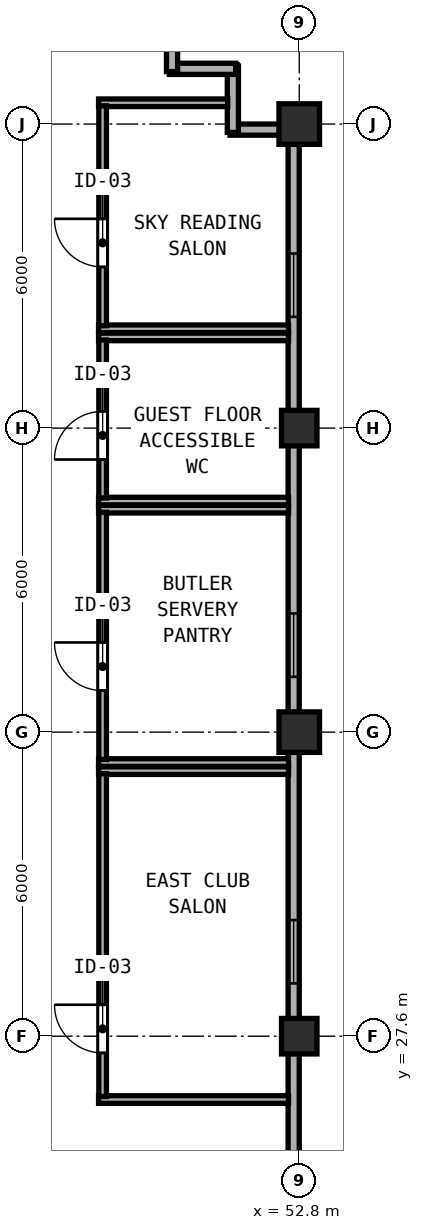
"""IFC4 building model, lengths in metres.
Left out: names, types, materials, properties, quantities, classifications, styles, units other than length and angle.
Written with IfcOpenShell. Run it as: python <this file> out.ifc"""

import sys

from ifc_helpers import new_model, si_unit, direction, frame, frame_2d, origin, origin_2d, place, context, subcontext, project, spatial, rectangle, hollow_rectangle, extrude, element, fill, save


model = new_model("IFC4")
c1 = context("Model", 3, precision=1e-05, world=origin(), true_north=direction((0.0, 1.0)))
c2 = subcontext(c1, "Body", "Model", "MODEL_VIEW")
j1 = project(units=[si_unit("LENGTHUNIT", "METRE"), si_unit("PLANEANGLEUNIT", "RADIAN")], contexts=[c1])
p1 = place(None, origin())
s1 = spatial("IfcSite", under=j1, at=p1, CompositionType="ELEMENT")
p2 = place(p1, origin())
s2 = spatial("IfcBuilding", under=s1, at=p2, CompositionType="ELEMENT")
p3 = place(p2, frame((0.0, 0.0, 254.45)))
s3 = spatial("IfcBuildingStorey", under=s2, at=p3, CompositionType="ELEMENT", Elevation=254.45)
for number, where, z_axis, x_axis in (
    (1, (52.8, 33.6, 0.0), (0.0, 0.0, 1.0), (1.0, 0.0, 0.0)),
    (2, (52.8, 45.6, 0.0), (0.0, 0.0, 1.0), (1.0, 0.0, 0.0)),
):
    element("IfcColumn", number, at=place(p3, frame(where, z_axis=z_axis, x_axis=x_axis)), inside=s3, PredefinedType="COLUMN", context=c2, shape_type="SweptSolid", body=[
        extrude(hollow_rectangle(XDim=0.8, YDim=0.8, WallThickness=0.03, at=origin_2d()), origin(), (0.0, 0.0, 1.0), 3.85),
    ])
for number, where, z_axis, x_axis in (
    (3, (52.8, 27.6, 0.0), (0.0, 0.0, 1.0), (1.0, 0.0, 0.0)),
    (4, (52.8, 39.6, 0.0), (0.0, 0.0, 1.0), (1.0, 0.0, 0.0)),
):
    element("IfcColumn", number, at=place(p3, frame(where, z_axis=z_axis, x_axis=x_axis)), inside=s3, PredefinedType="COLUMN", context=c2, shape_type="SweptSolid", body=[
        extrude(hollow_rectangle(XDim=0.7, YDim=0.7, WallThickness=0.026, at=origin_2d()), origin(), (0.0, 0.0, 1.0), 3.85),
    ])
p4 = place(p3, frame((52.69, 21.992, 0.0), z_axis=(0.0, 0.0, 1.0), x_axis=(0.0, 1.0, 0.0)))
e5 = element("IfcWall", 5, at=p4, inside=s3, PredefinedType="SOLIDWALL", context=c2, shape_type="SweptSolid", body=[
    extrude(rectangle(XDim=5.266, YDim=0.22, at=frame_2d((2.633, 0.0))), origin(), (0.0, 0.0, 1.0), 3.315),
])
p5 = place(p4, frame((0.7, 0.0, 0.85)))
e6 = element("IfcOpeningElement", 6, at=p5, cuts=e5, PredefinedType="OPENING", context=c2, shape_type="SweptSolid", body=[
    extrude(rectangle(XDim=1.25, YDim=1.95, at=frame_2d((0.625, 0.975))), frame((0.0, 0.12, 0.0), z_axis=(0.0, -1.0, 0.0), x_axis=(1.0, 0.0, 0.0)), (0.0, 0.0, 1.0), 0.24),
])
p6 = place(p3, frame((52.69, 27.942, 0.0), z_axis=(0.0, 0.0, 1.0), x_axis=(0.0, 1.0, 0.0)))
e7 = element("IfcWall", 7, at=p6, inside=s3, PredefinedType="SOLIDWALL", context=c2, shape_type="SweptSolid", body=[
    extrude(rectangle(XDim=5.266, YDim=0.22, at=frame_2d((2.633, 0.0))), origin(), (0.0, 0.0, 1.0), 3.315),
])
p7 = place(p6, frame((0.7, 0.0, 0.85)))
e8 = element("IfcOpeningElement", 8, at=p7, cuts=e7, PredefinedType="OPENING", context=c2, shape_type="SweptSolid", body=[
    extrude(rectangle(XDim=1.25, YDim=1.95, at=frame_2d((0.625, 0.975))), frame((0.0, 0.12, 0.0), z_axis=(0.0, -1.0, 0.0), x_axis=(1.0, 0.0, 0.0)), (0.0, 0.0, 1.0), 0.24),
])
p8 = place(p3, frame((52.69, 33.992, 0.0), z_axis=(0.0, 0.0, 1.0), x_axis=(0.0, 1.0, 0.0)))
e9 = element("IfcWall", 9, at=p8, inside=s3, PredefinedType="SOLIDWALL", context=c2, shape_type="SweptSolid", body=[
    extrude(rectangle(XDim=5.266, YDim=0.22, at=frame_2d((2.633, 0.0))), origin(), (0.0, 0.0, 1.0), 3.315),
])
p9 = place(p8, frame((0.7, 0.0, 0.85)))
e10 = element("IfcOpeningElement", 10, at=p9, cuts=e9, PredefinedType="OPENING", context=c2, shape_type="SweptSolid", body=[
    extrude(rectangle(XDim=1.25, YDim=1.95, at=frame_2d((0.625, 0.975))), frame((0.0, 0.12, 0.0), z_axis=(0.0, -1.0, 0.0), x_axis=(1.0, 0.0, 0.0)), (0.0, 0.0, 1.0), 0.24),
])
p10 = place(p3, frame((52.69, 39.942, 0.0), z_axis=(0.0, 0.0, 1.0), x_axis=(0.0, 1.0, 0.0)))
e11 = element("IfcWall", 11, at=p10, inside=s3, PredefinedType="SOLIDWALL", context=c2, shape_type="SweptSolid", body=[
    extrude(rectangle(XDim=5.266, YDim=0.22, at=frame_2d((2.633, 0.0))), origin(), (0.0, 0.0, 1.0), 3.315),
])
p11 = place(p10, frame((1.853, 0.0, 0.85)))
e12 = element("IfcOpeningElement", 12, at=p11, cuts=e11, PredefinedType="OPENING", context=c2, shape_type="SweptSolid", body=[
    extrude(rectangle(XDim=1.25, YDim=1.95, at=frame_2d((0.625, 0.975))), frame((0.0, 0.12, 0.0), z_axis=(0.0, -1.0, 0.0), x_axis=(1.0, 0.0, 0.0)), (0.0, 0.0, 1.0), 0.24),
])
p12 = place(p3, frame((52.408, 45.49, 0.0), z_axis=(0.0, 0.0, 1.0), x_axis=(-1.0, 0.0, 0.0)))
e13 = element("IfcWall", 13, at=p12, inside=s3, PredefinedType="SOLIDWALL", context=c2, shape_type="SweptSolid", body=[
    extrude(rectangle(XDim=0.973, YDim=0.22, at=frame_2d((0.486, 0.0))), origin(), (0.0, 0.0, 1.0), 3.67),
])
p13 = place(p3, frame((51.49, 45.435, 0.0), z_axis=(0.0, 0.0, 1.0), x_axis=(0.0, 1.0, 0.0)))
e14 = element("IfcWall", 14, at=p13, inside=s3, PredefinedType="SOLIDWALL", context=c2, shape_type="SweptSolid", body=[
    extrude(rectangle(XDim=1.31, YDim=0.22, at=frame_2d((0.655, 0.0))), origin(), (0.0, 0.0, 1.0), 3.67),
])
p14 = place(p3, frame((51.545, 46.69, 0.0), z_axis=(0.0, 0.0, 1.0), x_axis=(-1.0, 0.0, 0.0)))
e15 = element("IfcWall", 15, at=p14, inside=s3, PredefinedType="SOLIDWALL", context=c2, shape_type="SweptSolid", body=[
    extrude(rectangle(XDim=1.31, YDim=0.22, at=frame_2d((0.655, 0.0))), origin(), (0.0, 0.0, 1.0), 3.67),
])
p15 = place(p3, frame((50.29, 46.635, 0.0), z_axis=(0.0, 0.0, 1.0), x_axis=(0.0, 1.0, 0.0)))
e16 = element("IfcWall", 16, at=p15, inside=s3, PredefinedType="SOLIDWALL", context=c2, shape_type="SweptSolid", body=[
    extrude(rectangle(XDim=1.535, YDim=0.22, at=frame_2d((0.768, 0.0))), origin(), (0.0, 0.0, 1.0), 3.67),
])
for number, where, z_axis, x_axis in (
    (17, (48.84, 38.0, 0.0), (0.0, 0.0, 1.0), (1.0, 0.0, 0.0)),
    (18, (48.84, 33.0, 0.0), (0.0, 0.0, 1.0), (1.0, 0.0, 0.0)),
):
    element("IfcWall", number, at=place(p3, frame(where, z_axis=z_axis, x_axis=x_axis)), inside=s3, PredefinedType="PARTITIONING", context=c2, shape_type="SweptSolid", body=[
        extrude(rectangle(XDim=3.748, YDim=0.15, at=frame_2d((1.874, 0.0))), origin(), (0.0, 0.0, 1.0), 3.67),
    ])
p16 = place(p3, frame((48.92, 33.06, 0.0), z_axis=(0.0, 0.0, 1.0), x_axis=(0.0, 1.0, 0.0)))
e19 = element("IfcWall", 19, at=p16, inside=s3, PredefinedType="PARTITIONING", context=c2, shape_type="SweptSolid", body=[
    extrude(rectangle(XDim=4.88, YDim=0.15, at=frame_2d((2.44, 0.0))), origin(), (0.0, 0.0, 1.0), 3.67),
])
p17 = place(p16, frame((1.36, 0.0, 0.0)))
e20 = element("IfcOpeningElement", 20, at=p17, cuts=e19, PredefinedType="OPENING", context=c2, shape_type="SweptSolid", body=[
    extrude(rectangle(XDim=0.95, YDim=2.12, at=frame_2d((0.475, 1.06))), frame((0.0, 0.085, 0.0), z_axis=(0.0, -1.0, 0.0), x_axis=(1.0, 0.0, 0.0)), (0.0, 0.0, 1.0), 0.17),
])
for number, where, z_axis, x_axis in (
    (21, (48.84, 41.4, 0.0), (0.0, 0.0, 1.0), (1.0, 0.0, 0.0)),
    (22, (48.84, 38.16, 0.0), (0.0, 0.0, 1.0), (1.0, 0.0, 0.0)),
):
    element("IfcWall", number, at=place(p3, frame(where, z_axis=z_axis, x_axis=x_axis)), inside=s3, PredefinedType="PARTITIONING", context=c2, shape_type="SweptSolid", body=[
        extrude(rectangle(XDim=3.748, YDim=0.15, at=frame_2d((1.874, 0.0))), origin(), (0.0, 0.0, 1.0), 3.67),
    ])
p18 = place(p3, frame((48.92, 38.22, 0.0), z_axis=(0.0, 0.0, 1.0), x_axis=(0.0, 1.0, 0.0)))
e23 = element("IfcWall", 23, at=p18, inside=s3, PredefinedType="PARTITIONING", context=c2, shape_type="SweptSolid", body=[
    extrude(rectangle(XDim=3.12, YDim=0.15, at=frame_2d((1.56, 0.0))), origin(), (0.0, 0.0, 1.0), 3.67),
])
p19 = place(p18, frame((0.76, 0.0, 0.0)))
e24 = element("IfcOpeningElement", 24, at=p19, cuts=e23, PredefinedType="OPENING", context=c2, shape_type="SweptSolid", body=[
    extrude(rectangle(XDim=0.95, YDim=2.12, at=frame_2d((0.475, 1.06))), frame((0.0, 0.085, 0.0), z_axis=(0.0, -1.0, 0.0), x_axis=(1.0, 0.0, 0.0)), (0.0, 0.0, 1.0), 0.17),
])
p20 = place(p3, frame((48.84, 46.02, 0.0), z_axis=(0.0, 0.0, 1.0), x_axis=(1.0, 0.0, 0.0)))
e25 = element("IfcWall", 25, at=p20, inside=s3, PredefinedType="PARTITIONING", context=c2, shape_type="SweptSolid", body=[
    extrude(rectangle(XDim=2.548, YDim=0.15, at=frame_2d((1.274, 0.0))), origin(), (0.0, 0.0, 1.0), 3.67),
])
p21 = place(p3, frame((48.84, 41.56, 0.0), z_axis=(0.0, 0.0, 1.0), x_axis=(1.0, 0.0, 0.0)))
e26 = element("IfcWall", 26, at=p21, inside=s3, PredefinedType="PARTITIONING", context=c2, shape_type="SweptSolid", body=[
    extrude(rectangle(XDim=3.748, YDim=0.15, at=frame_2d((1.874, 0.0))), origin(), (0.0, 0.0, 1.0), 3.67),
])
p22 = place(p3, frame((48.92, 41.62, 0.0), z_axis=(0.0, 0.0, 1.0), x_axis=(0.0, 1.0, 0.0)))
e27 = element("IfcWall", 27, at=p22, inside=s3, PredefinedType="PARTITIONING", context=c2, shape_type="SweptSolid", body=[
    extrude(rectangle(XDim=4.34, YDim=0.15, at=frame_2d((2.17, 0.0))), origin(), (0.0, 0.0, 1.0), 3.67),
])
p23 = place(p22, frame((1.16, 0.0, 0.0)))
e28 = element("IfcOpeningElement", 28, at=p23, cuts=e27, PredefinedType="OPENING", context=c2, shape_type="SweptSolid", body=[
    extrude(rectangle(XDim=0.95, YDim=2.12, at=frame_2d((0.475, 1.06))), frame((0.0, 0.085, 0.0), z_axis=(0.0, -1.0, 0.0), x_axis=(1.0, 0.0, 0.0)), (0.0, 0.0, 1.0), 0.17),
])
for number, where, z_axis, x_axis in (
    (29, (48.84, 32.84, 0.0), (0.0, 0.0, 1.0), (1.0, 0.0, 0.0)),
    (30, (48.84, 26.35, 0.0), (0.0, 0.0, 1.0), (1.0, 0.0, 0.0)),
):
    element("IfcWall", number, at=place(p3, frame(where, z_axis=z_axis, x_axis=x_axis)), inside=s3, PredefinedType="PARTITIONING", context=c2, shape_type="SweptSolid", body=[
        extrude(rectangle(XDim=3.748, YDim=0.15, at=frame_2d((1.874, 0.0))), origin(), (0.0, 0.0, 1.0), 3.67),
    ])
p24 = place(p3, frame((48.92, 26.41, 0.0), z_axis=(0.0, 0.0, 1.0), x_axis=(0.0, 1.0, 0.0)))
e31 = element("IfcWall", 31, at=p24, inside=s3, PredefinedType="PARTITIONING", context=c2, shape_type="SweptSolid", body=[
    extrude(rectangle(XDim=6.37, YDim=0.15, at=frame_2d((3.185, 0.0))), origin(), (0.0, 0.0, 1.0), 3.67),
])
p25 = place(p24, frame((0.86, 0.0, 0.0)))
e32 = element("IfcOpeningElement", 32, at=p25, cuts=e31, PredefinedType="OPENING", context=c2, shape_type="SweptSolid", body=[
    extrude(rectangle(XDim=0.95, YDim=2.12, at=frame_2d((0.475, 1.06))), frame((0.0, 0.085, 0.0), z_axis=(0.0, -1.0, 0.0), x_axis=(1.0, 0.0, 0.0)), (0.0, 0.0, 1.0), 0.17),
])
p26 = place(p7, origin())
e33 = element("IfcWindow", 33, at=p26, inside=s3, PartitioningType="SINGLE_PANEL", PredefinedType="WINDOW", context=c2, shape_type="SweptSolid", body=[
    extrude(rectangle(XDim=1.25, YDim=1.95, at=frame_2d((0.625, 0.975))), frame((0.0, 0.03, 0.0), z_axis=(0.0, -1.0, 0.0), x_axis=(1.0, 0.0, 0.0)), (0.0, 0.0, 1.0), 0.06),
])
fill(e8, e33)
p27 = place(p9, origin())
e34 = element("IfcWindow", 34, at=p27, inside=s3, PartitioningType="SINGLE_PANEL", PredefinedType="WINDOW", context=c2, shape_type="SweptSolid", body=[
    extrude(rectangle(XDim=1.25, YDim=1.95, at=frame_2d((0.625, 0.975))), frame((0.0, 0.03, 0.0), z_axis=(0.0, -1.0, 0.0), x_axis=(1.0, 0.0, 0.0)), (0.0, 0.0, 1.0), 0.06),
])
fill(e10, e34)
p28 = place(p11, origin())
e35 = element("IfcWindow", 35, at=p28, inside=s3, PartitioningType="SINGLE_PANEL", PredefinedType="WINDOW", context=c2, shape_type="SweptSolid", body=[
    extrude(rectangle(XDim=1.25, YDim=1.95, at=frame_2d((0.625, 0.975))), frame((0.0, 0.03, 0.0), z_axis=(0.0, -1.0, 0.0), x_axis=(1.0, 0.0, 0.0)), (0.0, 0.0, 1.0), 0.06),
])
fill(e12, e35)
p29 = place(p17, origin())
e36 = element("IfcDoor", 36, at=p29, inside=s3, OperationType="SINGLE_SWING_RIGHT", PredefinedType="DOOR", context=c2, shape_type="SweptSolid", body=[
    extrude(rectangle(XDim=0.95, YDim=2.12, at=frame_2d((0.475, 1.06))), frame((0.0, 0.025, 0.0), z_axis=(0.0, -1.0, 0.0), x_axis=(1.0, 0.0, 0.0)), (0.0, 0.0, 1.0), 0.05),
])
fill(e20, e36)
p30 = place(p19, origin())
e37 = element("IfcDoor", 37, at=p30, inside=s3, OperationType="SINGLE_SWING_LEFT", PredefinedType="DOOR", context=c2, shape_type="SweptSolid", body=[
    extrude(rectangle(XDim=0.95, YDim=2.12, at=frame_2d((0.475, 1.06))), frame((0.0, 0.025, 0.0), z_axis=(0.0, -1.0, 0.0), x_axis=(1.0, 0.0, 0.0)), (0.0, 0.0, 1.0), 0.05),
])
fill(e24, e37)
p31 = place(p23, origin())
e38 = element("IfcDoor", 38, at=p31, inside=s3, OperationType="SINGLE_SWING_RIGHT", PredefinedType="DOOR", context=c2, shape_type="SweptSolid", body=[
    extrude(rectangle(XDim=0.95, YDim=2.12, at=frame_2d((0.475, 1.06))), frame((0.0, 0.025, 0.0), z_axis=(0.0, -1.0, 0.0), x_axis=(1.0, 0.0, 0.0)), (0.0, 0.0, 1.0), 0.05),
])
fill(e28, e38)
p32 = place(p25, origin())
e39 = element("IfcDoor", 39, at=p32, inside=s3, OperationType="SINGLE_SWING_RIGHT", PredefinedType="DOOR", context=c2, shape_type="SweptSolid", body=[
    extrude(rectangle(XDim=0.95, YDim=2.12, at=frame_2d((0.475, 1.06))), frame((0.0, 0.025, 0.0), z_axis=(0.0, -1.0, 0.0), x_axis=(1.0, 0.0, 0.0)), (0.0, 0.0, 1.0), 0.05),
])
fill(e32, e39)
save(model, sys.argv[1])
